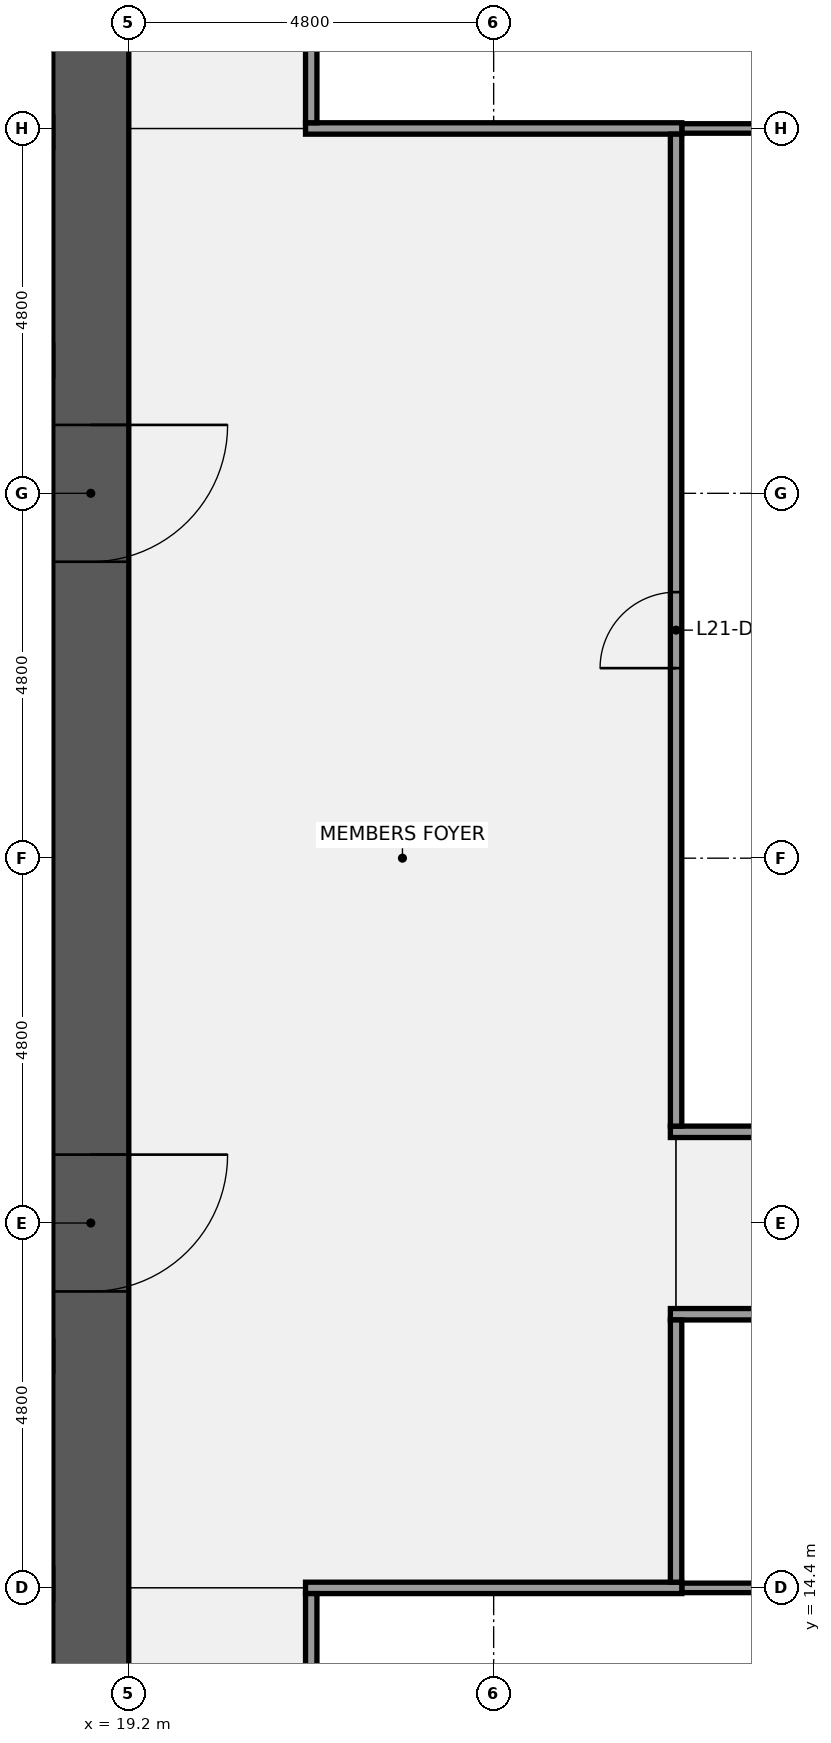
"""IFC4 building model, lengths in metres.
Left out: names, types, materials, properties, quantities, classifications, styles, units other than length and angle.
Written with IfcOpenShell. Run it as: python <this file> out.ifc"""

import sys

from ifc_helpers import new_model, si_unit, direction, frame, frame_2d, origin, place, context, subcontext, project, spatial, rectangle, extrude, element, fill, save


model = new_model("IFC4")
c1 = context("Model", 3, precision=1e-05, world=origin(), true_north=direction((0.0, 1.0)))
c2 = subcontext(c1, "Body", "Model", "MODEL_VIEW")
j1 = project(units=[si_unit("LENGTHUNIT", "METRE"), si_unit("PLANEANGLEUNIT", "RADIAN")], contexts=[c1])
p1 = place(None, origin())
s1 = spatial("IfcSite", under=j1, at=p1, CompositionType="ELEMENT")
p2 = place(p1, origin())
s2 = spatial("IfcBuilding", under=s1, at=p2, CompositionType="ELEMENT")
p3 = place(p2, frame((0.0, 0.0, 104.1)))
s3 = spatial("IfcBuildingStorey", under=s2, at=p3, CompositionType="ELEMENT", Elevation=104.1)
p4 = place(p3, frame((18.7, 38.4, 0.0), z_axis=(0.0, 0.0, 1.0), x_axis=(0.0, -1.0, 0.0)))
e1 = element("IfcWall", 1, at=p4, inside=s3, PredefinedType="SHEAR", context=c2, shape_type="SweptSolid", body=[
    extrude(rectangle(XDim=28.8, YDim=1.0, at=frame_2d((14.4, 0.0))), origin(), (0.0, 0.0, 1.0), 3.84),
])
p5 = place(p4, frame((18.3, 0.0, 0.0)))
e2 = element("IfcOpeningElement", 2, at=p5, cuts=e1, PredefinedType="OPENING", context=c2, shape_type="SweptSolid", body=[
    extrude(rectangle(XDim=1.8, YDim=2.1, at=frame_2d((0.9, 1.05))), frame((0.0, 0.51, 0.0), z_axis=(0.0, -1.0, 0.0), x_axis=(1.0, 0.0, 0.0)), (0.0, 0.0, 1.0), 1.02),
])
p6 = place(p4, frame((8.7, 0.0, 0.0)))
e3 = element("IfcOpeningElement", 3, at=p6, cuts=e1, PredefinedType="OPENING", context=c2, shape_type="SweptSolid", body=[
    extrude(rectangle(XDim=1.8, YDim=2.1, at=frame_2d((0.9, 1.05))), frame((0.0, 0.51, 0.0), z_axis=(0.0, -1.0, 0.0), x_axis=(1.0, 0.0, 0.0)), (0.0, 0.0, 1.0), 1.02),
])
p7 = place(p3, frame((1.0, 14.45, 0.0), z_axis=(0.0, 0.0, 1.0), x_axis=(1.0, 0.0, 0.0)))
e4 = element("IfcWall", 4, at=p7, inside=s3, PredefinedType="SHEAR", context=c2, shape_type="SweptSolid", body=[
    extrude(rectangle(XDim=17.2, YDim=0.4, at=frame_2d((8.6, 0.0))), origin(), (0.0, 0.0, 1.0), 3.84),
])
p8 = place(p3, frame((1.0, 17.45, 0.0), z_axis=(0.0, 0.0, 1.0), x_axis=(1.0, 0.0, 0.0)))
e5 = element("IfcWall", 5, at=p8, inside=s3, PredefinedType="SHEAR", context=c2, shape_type="SweptSolid", body=[
    extrude(rectangle(XDim=17.2, YDim=0.4, at=frame_2d((8.6, 0.0))), origin(), (0.0, 0.0, 1.0), 3.84),
])
p9 = place(p8, frame((1.663, 0.0, 0.0)))
e6 = element("IfcOpeningElement", 6, at=p9, cuts=e5, PredefinedType="OPENING", context=c2, shape_type="SweptSolid", body=[
    extrude(rectangle(XDim=1.0, YDim=2.1, at=frame_2d((0.5, 1.05))), frame((0.0, 0.21, 0.0), z_axis=(0.0, -1.0, 0.0), x_axis=(1.0, 0.0, 0.0)), (0.0, 0.0, 1.0), 0.42),
])
p10 = place(p8, frame((5.7, 0.0, 0.0)))
e7 = element("IfcOpeningElement", 7, at=p10, cuts=e5, PredefinedType="OPENING", context=c2, shape_type="SweptSolid", body=[
    extrude(rectangle(XDim=1.0, YDim=2.1, at=frame_2d((0.5, 1.05))), frame((0.0, 0.21, 0.0), z_axis=(0.0, -1.0, 0.0), x_axis=(1.0, 0.0, 0.0)), (0.0, 0.0, 1.0), 0.42),
])
p11 = place(p8, frame((9.0, 0.0, 0.0)))
e8 = element("IfcOpeningElement", 8, at=p11, cuts=e5, PredefinedType="OPENING", context=c2, shape_type="SweptSolid", body=[
    extrude(rectangle(XDim=1.0, YDim=2.1, at=frame_2d((0.5, 1.05))), frame((0.0, 0.21, 0.0), z_axis=(0.0, -1.0, 0.0), x_axis=(1.0, 0.0, 0.0)), (0.0, 0.0, 1.0), 0.42),
])
p12 = place(p8, frame((11.7, 0.0, 0.0)))
e9 = element("IfcOpeningElement", 9, at=p12, cuts=e5, PredefinedType="OPENING", context=c2, shape_type="SweptSolid", body=[
    extrude(rectangle(XDim=1.0, YDim=2.1, at=frame_2d((0.5, 1.05))), frame((0.0, 0.21, 0.0), z_axis=(0.0, -1.0, 0.0), x_axis=(1.0, 0.0, 0.0)), (0.0, 0.0, 1.0), 0.42),
])
p13 = place(p8, frame((14.837, 0.0, 0.0)))
e10 = element("IfcOpeningElement", 10, at=p13, cuts=e5, PredefinedType="OPENING", context=c2, shape_type="SweptSolid", body=[
    extrude(rectangle(XDim=1.0, YDim=2.1, at=frame_2d((0.5, 1.05))), frame((0.0, 0.21, 0.0), z_axis=(0.0, -1.0, 0.0), x_axis=(1.0, 0.0, 0.0)), (0.0, 0.0, 1.0), 0.42),
])
p14 = place(p3, frame((1.0, 30.55, 0.0), z_axis=(0.0, 0.0, 1.0), x_axis=(1.0, 0.0, 0.0)))
e11 = element("IfcWall", 11, at=p14, inside=s3, PredefinedType="SHEAR", context=c2, shape_type="SweptSolid", body=[
    extrude(rectangle(XDim=17.2, YDim=0.4, at=frame_2d((8.6, 0.0))), origin(), (0.0, 0.0, 1.0), 3.84),
])
p15 = place(p14, frame((0.762, 0.0, 0.0)))
e12 = element("IfcOpeningElement", 12, at=p15, cuts=e11, PredefinedType="OPENING", context=c2, shape_type="SweptSolid", body=[
    extrude(rectangle(XDim=1.0, YDim=2.1, at=frame_2d((0.5, 1.05))), frame((0.0, 0.21, 0.0), z_axis=(0.0, -1.0, 0.0), x_axis=(1.0, 0.0, 0.0)), (0.0, 0.0, 1.0), 0.42),
])
p16 = place(p14, frame((3.6, 0.0, 0.0)))
e13 = element("IfcOpeningElement", 13, at=p16, cuts=e11, PredefinedType="OPENING", context=c2, shape_type="SweptSolid", body=[
    extrude(rectangle(XDim=1.0, YDim=2.1, at=frame_2d((0.5, 1.05))), frame((0.0, 0.21, 0.0), z_axis=(0.0, -1.0, 0.0), x_axis=(1.0, 0.0, 0.0)), (0.0, 0.0, 1.0), 0.42),
])
p17 = place(p14, frame((6.6, 0.0, 0.0)))
e14 = element("IfcOpeningElement", 14, at=p17, cuts=e11, PredefinedType="OPENING", context=c2, shape_type="SweptSolid", body=[
    extrude(rectangle(XDim=1.0, YDim=2.1, at=frame_2d((0.5, 1.05))), frame((0.0, 0.21, 0.0), z_axis=(0.0, -1.0, 0.0), x_axis=(1.0, 0.0, 0.0)), (0.0, 0.0, 1.0), 0.42),
])
p18 = place(p14, frame((10.2, 0.0, 0.0)))
e15 = element("IfcOpeningElement", 15, at=p18, cuts=e11, PredefinedType="OPENING", context=c2, shape_type="SweptSolid", body=[
    extrude(rectangle(XDim=1.0, YDim=2.1, at=frame_2d((0.5, 1.05))), frame((0.0, 0.21, 0.0), z_axis=(0.0, -1.0, 0.0), x_axis=(1.0, 0.0, 0.0)), (0.0, 0.0, 1.0), 0.42),
])
p19 = place(p14, frame((14.538, 0.0, 0.0)))
e16 = element("IfcOpeningElement", 16, at=p19, cuts=e11, PredefinedType="OPENING", context=c2, shape_type="SweptSolid", body=[
    extrude(rectangle(XDim=1.0, YDim=2.1, at=frame_2d((0.5, 1.05))), frame((0.0, 0.21, 0.0), z_axis=(0.0, -1.0, 0.0), x_axis=(1.0, 0.0, 0.0)), (0.0, 0.0, 1.0), 0.42),
])
p20 = place(p3, frame((1.0, 33.55, 0.0), z_axis=(0.0, 0.0, 1.0), x_axis=(1.0, 0.0, 0.0)))
e17 = element("IfcWall", 17, at=p20, inside=s3, PredefinedType="SHEAR", context=c2, shape_type="SweptSolid", body=[
    extrude(rectangle(XDim=17.2, YDim=0.4, at=frame_2d((8.6, 0.0))), origin(), (0.0, 0.0, 1.0), 3.84),
])
p21 = place(p3, frame((26.475, 14.4, 0.0), z_axis=(0.0, 0.0, 1.0), x_axis=(1.0, 0.0, 0.0)))
e18 = element("IfcWall", 18, at=p21, inside=s3, PredefinedType="PARTITIONING", context=c2, shape_type="SweptSolid", body=[
    extrude(rectangle(XDim=4.8, YDim=0.125, at=frame_2d((2.4, 0.0))), origin(), (0.0, 0.0, 1.0), 2.936),
])
p22 = place(p3, frame((21.525, 14.4, 0.0), z_axis=(0.0, 0.0, 1.0), x_axis=(1.0, 0.0, 0.0)))
e19 = element("IfcWall", 19, at=p22, inside=s3, PredefinedType="PARTITIONING", context=c2, shape_type="SweptSolid", body=[
    extrude(rectangle(XDim=4.95, YDim=0.15, at=frame_2d((2.475, 0.0))), origin(), (0.0, 0.0, 1.0), 2.936),
])
p23 = place(p3, frame((26.325, 18.0, 0.0), z_axis=(0.0, 0.0, 1.0), x_axis=(1.0, 0.0, 0.0)))
e20 = element("IfcWall", 20, at=p23, inside=s3, PredefinedType="PARTITIONING", context=c2, shape_type="SweptSolid", body=[
    extrude(rectangle(XDim=4.95, YDim=0.15, at=frame_2d((2.475, 0.0))), origin(), (0.0, 0.0, 1.0), 2.936),
])
p24 = place(p23, frame((1.975, 0.0, 0.0)))
e21 = element("IfcOpeningElement", 21, at=p24, cuts=e20, PredefinedType="OPENING", context=c2, shape_type="SweptSolid", body=[
    extrude(rectangle(XDim=1.0, YDim=2.1, at=frame_2d((0.5, 1.05))), frame((0.0, 0.085, 0.0), z_axis=(0.0, -1.0, 0.0), x_axis=(1.0, 0.0, 0.0)), (0.0, 0.0, 1.0), 0.17),
])
p25 = place(p3, frame((26.325, 20.4, 0.0), z_axis=(0.0, 0.0, 1.0), x_axis=(1.0, 0.0, 0.0)))
e22 = element("IfcWall", 22, at=p25, inside=s3, PredefinedType="PARTITIONING", context=c2, shape_type="SweptSolid", body=[
    extrude(rectangle(XDim=4.95, YDim=0.15, at=frame_2d((2.475, 0.0))), origin(), (0.0, 0.0, 1.0), 2.936),
])
p26 = place(p3, frame((26.475, 33.6, 0.0), z_axis=(0.0, 0.0, 1.0), x_axis=(1.0, 0.0, 0.0)))
e23 = element("IfcWall", 23, at=p26, inside=s3, PredefinedType="PARTITIONING", context=c2, shape_type="SweptSolid", body=[
    extrude(rectangle(XDim=4.8, YDim=0.125, at=frame_2d((2.4, 0.0))), origin(), (0.0, 0.0, 1.0), 2.936),
])
p27 = place(p3, frame((21.525, 33.6, 0.0), z_axis=(0.0, 0.0, 1.0), x_axis=(1.0, 0.0, 0.0)))
e24 = element("IfcWall", 24, at=p27, inside=s3, PredefinedType="PARTITIONING", context=c2, shape_type="SweptSolid", body=[
    extrude(rectangle(XDim=4.95, YDim=0.15, at=frame_2d((2.475, 0.0))), origin(), (0.0, 0.0, 1.0), 2.936),
])
for number, where, z_axis, x_axis in (
    (25, (21.6, 9.675, 0.0), (0.0, 0.0, 1.0), (0.0, 1.0, 0.0)),
    (26, (21.6, 33.675, 0.0), (0.0, 0.0, 1.0), (0.0, 1.0, 0.0)),
):
    element("IfcWall", number, at=place(p3, frame(where, z_axis=z_axis, x_axis=x_axis)), inside=s3, PredefinedType="PARTITIONING", context=c2, shape_type="SweptSolid", body=[
        extrude(rectangle(XDim=4.65, YDim=0.15, at=frame_2d((2.325, 0.0))), origin(), (0.0, 0.0, 1.0), 2.936),
    ])
p28 = place(p3, frame((26.4, 14.475, 0.0), z_axis=(0.0, 0.0, 1.0), x_axis=(0.0, 1.0, 0.0)))
e27 = element("IfcWall", 27, at=p28, inside=s3, PredefinedType="PARTITIONING", context=c2, shape_type="SweptSolid", body=[
    extrude(rectangle(XDim=3.45, YDim=0.15, at=frame_2d((1.725, 0.0))), origin(), (0.0, 0.0, 1.0), 2.936),
])
p29 = place(p3, frame((26.4, 20.475, 0.0), z_axis=(0.0, 0.0, 1.0), x_axis=(0.0, 1.0, 0.0)))
e28 = element("IfcWall", 28, at=p29, inside=s3, PredefinedType="PARTITIONING", context=c2, shape_type="SweptSolid", body=[
    extrude(rectangle(XDim=13.05, YDim=0.15, at=frame_2d((6.525, 0.0))), origin(), (0.0, 0.0, 1.0), 2.936),
])
p30 = place(p29, frame((6.025, 0.0, 0.0)))
e29 = element("IfcOpeningElement", 29, at=p30, cuts=e28, PredefinedType="OPENING", context=c2, shape_type="SweptSolid", body=[
    extrude(rectangle(XDim=1.0, YDim=2.1, at=frame_2d((0.5, 1.05))), frame((0.0, 0.085, 0.0), z_axis=(0.0, -1.0, 0.0), x_axis=(1.0, 0.0, 0.0)), (0.0, 0.0, 1.0), 0.17),
])
p31 = place(p5, origin())
e30 = element("IfcDoor", 30, at=p31, inside=s3, OperationType="DOUBLE_DOOR_SINGLE_SWING", PredefinedType="DOOR", context=c2, shape_type="SweptSolid", body=[
    extrude(rectangle(XDim=1.8, YDim=2.1, at=frame_2d((0.9, 1.05))), frame((0.0, 0.025, 0.0), z_axis=(0.0, -1.0, 0.0), x_axis=(1.0, 0.0, 0.0)), (0.0, 0.0, 1.0), 0.05),
])
fill(e2, e30)
p32 = place(p6, origin())
e31 = element("IfcDoor", 31, at=p32, inside=s3, OperationType="DOUBLE_DOOR_SINGLE_SWING", PredefinedType="DOOR", context=c2, shape_type="SweptSolid", body=[
    extrude(rectangle(XDim=1.8, YDim=2.1, at=frame_2d((0.9, 1.05))), frame((0.0, 0.025, 0.0), z_axis=(0.0, -1.0, 0.0), x_axis=(1.0, 0.0, 0.0)), (0.0, 0.0, 1.0), 0.05),
])
fill(e3, e31)
p33 = place(p30, origin())
e32 = element("IfcDoor", 32, at=p33, inside=s3, OperationType="SINGLE_SWING_LEFT", PredefinedType="DOOR", context=c2, shape_type="SweptSolid", body=[
    extrude(rectangle(XDim=1.0, YDim=2.1, at=frame_2d((0.5, 1.05))), frame((0.0, 0.025, 0.0), z_axis=(0.0, -1.0, 0.0), x_axis=(1.0, 0.0, 0.0)), (0.0, 0.0, 1.0), 0.05),
])
fill(e29, e32)
save(model, sys.argv[1])
